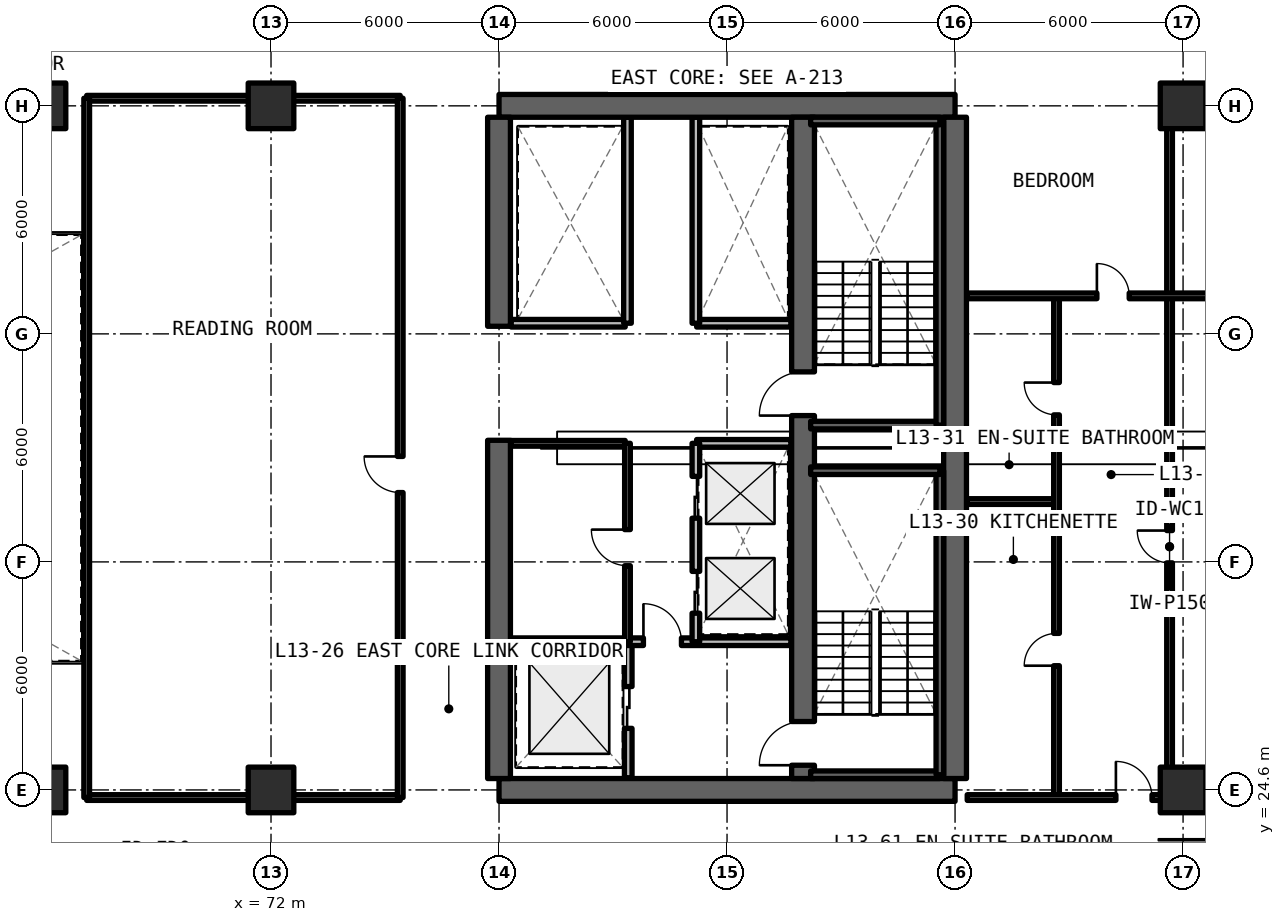
"""IFC4 building model, lengths in metres.
Left out: names, types, materials, properties, quantities, classifications, styles, units other than length and angle.
Written with IfcOpenShell. Run it as: python <this file> out.ifc"""

import sys

from ifc_helpers import new_model, si_unit, direction, frame, frame_2d, origin, origin_2d, place, context, subcontext, project, spatial, rectangle, extrude, element, fill, save


model = new_model("IFC4")
c1 = context("Model", 3, precision=1e-05, world=origin(), true_north=direction((0.0, 1.0)))
c2 = subcontext(c1, "Body", "Model", "MODEL_VIEW")
j1 = project(units=[si_unit("LENGTHUNIT", "METRE"), si_unit("PLANEANGLEUNIT", "RADIAN")], contexts=[c1])
p1 = place(None, origin())
s1 = spatial("IfcSite", under=j1, at=p1, CompositionType="ELEMENT")
p2 = place(p1, origin())
s2 = spatial("IfcBuilding", under=s1, at=p2, CompositionType="ELEMENT")
p3 = place(p2, frame((0.0, 0.0, 48.84)))
s3 = spatial("IfcBuildingStorey", under=s2, at=p3, CompositionType="ELEMENT", Elevation=48.84)
for number, where, z_axis, x_axis in (
    (1, (78.0, 24.6, 0.0), (0.0, 0.0, 1.0), (1.0, 0.0, 0.0)),
    (2, (90.0, 42.6, 0.0), (0.0, 0.0, 1.0), (-1.0, 0.0, 0.0)),
):
    element("IfcWall", number, at=place(p3, frame(where, z_axis=z_axis, x_axis=x_axis)), inside=s3, PredefinedType="SHEAR", context=c2, shape_type="SweptSolid", body=[
        extrude(rectangle(XDim=12.0, YDim=0.6, at=frame_2d((6.0, 0.0))), origin(), (0.0, 0.0, 1.0), 3.3),
    ])
p4 = place(p3, frame((90.0, 24.9, 0.0), z_axis=(0.0, 0.0, 1.0), x_axis=(0.0, 1.0, 0.0)))
e3 = element("IfcWall", 3, at=p4, inside=s3, PredefinedType="SHEAR", context=c2, shape_type="SweptSolid", body=[
    extrude(rectangle(XDim=17.4, YDim=0.6, at=frame_2d((8.7, 0.0))), origin(), (0.0, 0.0, 1.0), 3.3),
])
p5 = place(p3, frame((78.0, 24.9, 0.0), z_axis=(0.0, 0.0, 1.0), x_axis=(0.0, 1.0, 0.0)))
e4 = element("IfcWall", 4, at=p5, inside=s3, PredefinedType="SHEAR", context=c2, shape_type="SweptSolid", body=[
    extrude(rectangle(XDim=8.9, YDim=0.6, at=frame_2d((4.45, 0.0))), origin(), (0.0, 0.0, 1.0), 3.3),
])
p6 = place(p3, frame((78.0, 36.8, 0.0), z_axis=(0.0, 0.0, 1.0), x_axis=(0.0, 1.0, 0.0)))
e5 = element("IfcWall", 5, at=p6, inside=s3, PredefinedType="SHEAR", context=c2, shape_type="SweptSolid", body=[
    extrude(rectangle(XDim=5.5, YDim=0.6, at=frame_2d((2.75, 0.0))), origin(), (0.0, 0.0, 1.0), 3.3),
])
p7 = place(p3, frame((86.0, 24.9, 0.0), z_axis=(0.0, 0.0, 1.0), x_axis=(0.0, 1.0, 0.0)))
e6 = element("IfcWall", 6, at=p7, inside=s3, PredefinedType="SHEAR", context=c2, shape_type="SweptSolid", body=[
    extrude(rectangle(XDim=17.4, YDim=0.6, at=frame_2d((8.7, 0.0))), origin(), (0.0, 0.0, 1.0), 3.3),
])
p8 = place(p7, frame((0.35, 0.0, 0.0)))
e7 = element("IfcOpeningElement", 7, at=p8, cuts=e6, PredefinedType="OPENING", context=c2, shape_type="SweptSolid", body=[
    extrude(rectangle(XDim=1.15, YDim=2.15, at=frame_2d((0.575, 1.075))), frame((0.0, 0.31, 0.0), z_axis=(0.0, -1.0, 0.0), x_axis=(1.0, 0.0, 0.0)), (0.0, 0.0, 1.0), 0.62),
])
p9 = place(p7, frame((9.55, 0.0, 0.0)))
e8 = element("IfcOpeningElement", 8, at=p9, cuts=e6, PredefinedType="OPENING", context=c2, shape_type="SweptSolid", body=[
    extrude(rectangle(XDim=1.15, YDim=2.15, at=frame_2d((0.575, 1.075))), frame((0.0, 0.31, 0.0), z_axis=(0.0, -1.0, 0.0), x_axis=(1.0, 0.0, 0.0)), (0.0, 0.0, 1.0), 0.62),
])
for number, where, z_axis, x_axis in (
    (9, (66.0, 24.6, 0.0), (0.0, 0.0, 1.0), (1.0, 0.0, 0.0)),
    (10, (66.0, 42.6, 0.0), (0.0, 0.0, 1.0), (1.0, 0.0, 0.0)),
    (11, (72.0, 24.6, 0.0), (0.0, 0.0, 1.0), (1.0, 0.0, 0.0)),
    (12, (72.0, 42.6, 0.0), (0.0, 0.0, 1.0), (1.0, 0.0, 0.0)),
    (13, (96.0, 24.6, 0.0), (0.0, 0.0, 1.0), (1.0, 0.0, 0.0)),
    (14, (96.0, 42.6, 0.0), (0.0, 0.0, 1.0), (1.0, 0.0, 0.0)),
):
    element("IfcColumn", number, at=place(p3, frame(where, z_axis=z_axis, x_axis=x_axis)), inside=s3, PredefinedType="COLUMN", context=c2, shape_type="SweptSolid", body=[
        extrude(rectangle(XDim=1.2, YDim=1.2, at=origin_2d()), origin(), (0.0, 0.0, 1.0), 3.3),
    ])
p10 = place(p3, frame((81.4, 24.92, 0.0), z_axis=(0.0, 0.0, 1.0), x_axis=(0.0, 1.0, 0.0)))
e15 = element("IfcWall", 15, at=p10, inside=s3, PredefinedType="SOLIDWALL", context=c2, shape_type="SweptSolid", body=[
    extrude(rectangle(XDim=3.58, YDim=0.2, at=frame_2d((1.79, 0.0))), origin(), (0.0, 0.0, 1.0), 2.35),
])
p11 = place(p10, frame((1.3, 0.0, 0.0)))
e16 = element("IfcOpeningElement", 16, at=p11, cuts=e15, PredefinedType="OPENING", context=c2, shape_type="SweptSolid", body=[
    extrude(rectangle(XDim=1.1, YDim=2.2, at=frame_2d((0.55, 1.1))), frame((0.0, 0.11, 0.0), z_axis=(0.0, -1.0, 0.0), x_axis=(1.0, 0.0, 0.0)), (0.0, 0.0, 1.0), 0.22),
])
p12 = place(p3, frame((78.32, 28.5, 0.0), z_axis=(0.0, 0.0, 1.0), x_axis=(1.0, 0.0, 0.0)))
e17 = element("IfcWall", 17, at=p12, inside=s3, PredefinedType="SOLIDWALL", context=c2, shape_type="SweptSolid", body=[
    extrude(rectangle(XDim=7.36, YDim=0.2, at=frame_2d((3.68, 0.0))), origin(), (0.0, 0.0, 1.0), 2.35),
])
p13 = place(p12, frame((3.48, 0.0, 0.0)))
e18 = element("IfcOpeningElement", 18, at=p13, cuts=e17, PredefinedType="OPENING", context=c2, shape_type="SweptSolid", body=[
    extrude(rectangle(XDim=1.0, YDim=2.15, at=frame_2d((0.5, 1.075))), frame((0.0, 0.11, 0.0), z_axis=(0.0, -1.0, 0.0), x_axis=(1.0, 0.0, 0.0)), (0.0, 0.0, 1.0), 0.22),
])
p14 = place(p3, frame((83.2, 33.72, 0.0), z_axis=(0.0, 0.0, 1.0), x_axis=(1.0, 0.0, 0.0)))
e19 = element("IfcWall", 19, at=p14, inside=s3, PredefinedType="SOLIDWALL", context=c2, shape_type="SweptSolid", body=[
    extrude(rectangle(XDim=2.48, YDim=0.2, at=frame_2d((1.24, 0.0))), origin(), (0.0, 0.0, 1.0), 2.35),
])
p15 = place(p3, frame((83.18, 28.5, 0.0), z_axis=(0.0, 0.0, 1.0), x_axis=(0.0, 1.0, 0.0)))
e20 = element("IfcWall", 20, at=p15, inside=s3, PredefinedType="SOLIDWALL", context=c2, shape_type="SweptSolid", body=[
    extrude(rectangle(XDim=5.22, YDim=0.2, at=frame_2d((2.61, 0.0))), origin(), (0.0, 0.0, 1.0), 2.35),
])
p16 = place(p15, frame((0.75, 0.0, 0.0)))
e21 = element("IfcOpeningElement", 21, at=p16, cuts=e20, PredefinedType="OPENING", context=c2, shape_type="SweptSolid", body=[
    extrude(rectangle(XDim=1.1, YDim=2.2, at=frame_2d((0.55, 1.1))), frame((0.0, 0.11, 0.0), z_axis=(0.0, -1.0, 0.0), x_axis=(1.0, 0.0, 0.0)), (0.0, 0.0, 1.0), 0.22),
])
p17 = place(p15, frame((3.25, 0.0, 0.0)))
e22 = element("IfcOpeningElement", 22, at=p17, cuts=e20, PredefinedType="OPENING", context=c2, shape_type="SweptSolid", body=[
    extrude(rectangle(XDim=1.1, YDim=2.2, at=frame_2d((0.55, 1.1))), frame((0.0, 0.11, 0.0), z_axis=(0.0, -1.0, 0.0), x_axis=(1.0, 0.0, 0.0)), (0.0, 0.0, 1.0), 0.22),
])
p18 = place(p3, frame((78.32, 33.72, 0.0), z_axis=(0.0, 0.0, 1.0), x_axis=(1.0, 0.0, 0.0)))
e23 = element("IfcWall", 23, at=p18, inside=s3, PredefinedType="SOLIDWALL", context=c2, shape_type="SweptSolid", body=[
    extrude(rectangle(XDim=3.0, YDim=0.15, at=frame_2d((1.5, 0.0))), origin(), (0.0, 0.0, 1.0), 2.35),
])
p19 = place(p3, frame((81.38, 28.5, 0.0), z_axis=(0.0, 0.0, 1.0), x_axis=(0.0, 1.0, 0.0)))
e24 = element("IfcWall", 24, at=p19, inside=s3, PredefinedType="SOLIDWALL", context=c2, shape_type="SweptSolid", body=[
    extrude(rectangle(XDim=5.22, YDim=0.15, at=frame_2d((2.61, 0.0))), origin(), (0.0, 0.0, 1.0), 2.35),
])
p20 = place(p19, frame((2.0, 0.0, 0.0)))
e25 = element("IfcOpeningElement", 25, at=p20, cuts=e24, PredefinedType="OPENING", context=c2, shape_type="SweptSolid", body=[
    extrude(rectangle(XDim=0.95, YDim=2.15, at=frame_2d((0.475, 1.075))), frame((0.0, 0.085, 0.0), z_axis=(0.0, -1.0, 0.0), x_axis=(1.0, 0.0, 0.0)), (0.0, 0.0, 1.0), 0.17),
])
p21 = place(p3, frame((83.2, 36.88, 0.0), z_axis=(0.0, 0.0, 1.0), x_axis=(1.0, 0.0, 0.0)))
e26 = element("IfcWall", 26, at=p21, inside=s3, PredefinedType="SOLIDWALL", context=c2, shape_type="SweptSolid", body=[
    extrude(rectangle(XDim=2.48, YDim=0.2, at=frame_2d((1.24, 0.0))), origin(), (0.0, 0.0, 1.0), 2.35),
])
p22 = place(p3, frame((83.18, 36.88, 0.0), z_axis=(0.0, 0.0, 1.0), x_axis=(0.0, 1.0, 0.0)))
e27 = element("IfcWall", 27, at=p22, inside=s3, PredefinedType="SOLIDWALL", context=c2, shape_type="SweptSolid", body=[
    extrude(rectangle(XDim=5.42, YDim=0.2, at=frame_2d((2.71, 0.0))), origin(), (0.0, 0.0, 1.0), 2.35),
])
p23 = place(p3, frame((78.32, 36.88, 0.0), z_axis=(0.0, 0.0, 1.0), x_axis=(1.0, 0.0, 0.0)))
e28 = element("IfcWall", 28, at=p23, inside=s3, PredefinedType="SOLIDWALL", context=c2, shape_type="SweptSolid", body=[
    extrude(rectangle(XDim=3.0, YDim=0.2, at=frame_2d((1.5, 0.0))), origin(), (0.0, 0.0, 1.0), 2.35),
])
p24 = place(p3, frame((81.38, 36.88, 0.0), z_axis=(0.0, 0.0, 1.0), x_axis=(0.0, 1.0, 0.0)))
e29 = element("IfcWall", 29, at=p24, inside=s3, PredefinedType="SOLIDWALL", context=c2, shape_type="SweptSolid", body=[
    extrude(rectangle(XDim=5.42, YDim=0.2, at=frame_2d((2.71, 0.0))), origin(), (0.0, 0.0, 1.0), 2.35),
])
for number, where, z_axis, x_axis in (
    (30, (67.15, 24.4, 0.0), (0.0, 0.0, 1.0), (1.0, 0.0, 0.0)),
    (31, (67.15, 42.8, 0.0), (0.0, 0.0, 1.0), (1.0, 0.0, 0.0)),
):
    element("IfcWall", number, at=place(p3, frame(where, z_axis=z_axis, x_axis=x_axis)), inside=s3, PredefinedType="SOLIDWALL", context=c2, shape_type="SweptSolid", body=[
        extrude(rectangle(XDim=8.25, YDim=0.15, at=frame_2d((4.125, 0.0))), origin(), (0.0, 0.0, 1.0), 2.295),
    ])
p25 = place(p3, frame((67.15, 24.4, 0.0), z_axis=(0.0, 0.0, 1.0), x_axis=(0.0, 1.0, 0.0)))
e32 = element("IfcWall", 32, at=p25, inside=s3, PredefinedType="SOLIDWALL", context=c2, shape_type="SweptSolid", body=[
    extrude(rectangle(XDim=18.4, YDim=0.15, at=frame_2d((9.2, 0.0))), origin(), (0.0, 0.0, 1.0), 2.35),
])
p26 = place(p3, frame((75.4, 24.4, 0.0), z_axis=(0.0, 0.0, 1.0), x_axis=(0.0, 1.0, 0.0)))
e33 = element("IfcWall", 33, at=p26, inside=s3, PredefinedType="SOLIDWALL", context=c2, shape_type="SweptSolid", body=[
    extrude(rectangle(XDim=18.4, YDim=0.15, at=frame_2d((9.2, 0.0))), origin(), (0.0, 0.0, 1.0), 2.35),
])
p27 = place(p26, frame((8.025, 0.0, 0.0)))
e34 = element("IfcOpeningElement", 34, at=p27, cuts=e33, PredefinedType="OPENING", context=c2, shape_type="SweptSolid", body=[
    extrude(rectangle(XDim=0.95, YDim=2.15, at=frame_2d((0.475, 1.075))), frame((0.0, 0.085, 0.0), z_axis=(0.0, -1.0, 0.0), x_axis=(1.0, 0.0, 0.0)), (0.0, 0.0, 1.0), 0.17),
])
p28 = place(p3, frame((95.645, 24.4, 0.0), z_axis=(0.0, 0.0, 1.0), x_axis=(0.0, 1.0, 0.0)))
e35 = element("IfcWall", 35, at=p28, inside=s3, PredefinedType="PARTITIONING", context=c2, shape_type="SweptSolid", body=[
    extrude(rectangle(XDim=13.2, YDim=0.15, at=frame_2d((6.6, 0.0))), origin(), (0.0, 0.0, 1.0), 2.35),
])
p29 = place(p28, frame((6.175, 0.0, 0.0)))
e36 = element("IfcOpeningElement", 36, at=p29, cuts=e35, PredefinedType="OPENING", context=c2, shape_type="SweptSolid", body=[
    extrude(rectangle(XDim=0.85, YDim=2.1, at=frame_2d((0.425, 1.05))), frame((0.0, 0.085, 0.0), z_axis=(0.0, -1.0, 0.0), x_axis=(1.0, 0.0, 0.0)), (0.0, 0.0, 1.0), 0.17),
])
p30 = place(p3, frame((90.32, 32.188, 0.0), z_axis=(0.0, 0.0, 1.0), x_axis=(1.0, 0.0, 0.0)))
e37 = element("IfcWall", 37, at=p30, inside=s3, PredefinedType="PARTITIONING", context=c2, shape_type="SweptSolid", body=[
    extrude(rectangle(XDim=2.35, YDim=0.15, at=frame_2d((1.175, 0.0))), origin(), (0.0, 0.0, 1.0), 2.35),
])
p31 = place(p3, frame((92.67, 24.4, 0.0), z_axis=(0.0, 0.0, 1.0), x_axis=(0.0, 1.0, 0.0)))
e38 = element("IfcWall", 38, at=p31, inside=s3, PredefinedType="PARTITIONING", context=c2, shape_type="SweptSolid", body=[
    extrude(rectangle(XDim=13.2, YDim=0.15, at=frame_2d((6.6, 0.0))), origin(), (0.0, 0.0, 1.0), 2.35),
])
p32 = place(p31, frame((3.469, 0.0, 0.0)))
e39 = element("IfcOpeningElement", 39, at=p32, cuts=e38, PredefinedType="OPENING", context=c2, shape_type="SweptSolid", body=[
    extrude(rectangle(XDim=0.85, YDim=2.1, at=frame_2d((0.425, 1.05))), frame((0.0, 0.085, 0.0), z_axis=(0.0, -1.0, 0.0), x_axis=(1.0, 0.0, 0.0)), (0.0, 0.0, 1.0), 0.17),
])
p33 = place(p31, frame((10.069, 0.0, 0.0)))
e40 = element("IfcOpeningElement", 40, at=p33, cuts=e38, PredefinedType="OPENING", context=c2, shape_type="SweptSolid", body=[
    extrude(rectangle(XDim=0.85, YDim=2.1, at=frame_2d((0.425, 1.05))), frame((0.0, 0.085, 0.0), z_axis=(0.0, -1.0, 0.0), x_axis=(1.0, 0.0, 0.0)), (0.0, 0.0, 1.0), 0.17),
])
p34 = place(p3, frame((95.645, 37.6, 0.0), z_axis=(0.0, 0.0, 1.0), x_axis=(0.0, 1.0, 0.0)))
e41 = element("IfcWall", 41, at=p34, inside=s3, PredefinedType="PARTITIONING", context=c2, shape_type="SweptSolid", body=[
    extrude(rectangle(XDim=5.2, YDim=0.15, at=frame_2d((2.6, 0.0))), origin(), (0.0, 0.0, 1.0), 2.35),
])
p35 = place(p3, frame((90.32, 37.6, 0.0), z_axis=(0.0, 0.0, 1.0), x_axis=(1.0, 0.0, 0.0)))
e42 = element("IfcWall", 42, at=p35, inside=s3, PredefinedType="PARTITIONING", context=c2, shape_type="SweptSolid", body=[
    extrude(rectangle(XDim=10.24, YDim=0.15, at=frame_2d((5.12, 0.0))), origin(), (0.0, 0.0, 1.0), 2.35),
])
p36 = place(p35, frame((3.412, 0.0, 0.0)))
e43 = element("IfcOpeningElement", 43, at=p36, cuts=e42, PredefinedType="OPENING", context=c2, shape_type="SweptSolid", body=[
    extrude(rectangle(XDim=0.85, YDim=2.1, at=frame_2d((0.425, 1.05))), frame((0.0, 0.085, 0.0), z_axis=(0.0, -1.0, 0.0), x_axis=(1.0, 0.0, 0.0)), (0.0, 0.0, 1.0), 0.17),
])
p37 = place(p35, frame((7.357, 0.0, 0.0)))
e44 = element("IfcOpeningElement", 44, at=p37, cuts=e42, PredefinedType="OPENING", context=c2, shape_type="SweptSolid", body=[
    extrude(rectangle(XDim=0.85, YDim=2.1, at=frame_2d((0.425, 1.05))), frame((0.0, 0.085, 0.0), z_axis=(0.0, -1.0, 0.0), x_axis=(1.0, 0.0, 0.0)), (0.0, 0.0, 1.0), 0.17),
])
p38 = place(p3, frame((90.32, 24.4, 0.0), z_axis=(0.0, 0.0, 1.0), x_axis=(1.0, 0.0, 0.0)))
e45 = element("IfcWall", 45, at=p38, inside=s3, PredefinedType="SOLIDWALL", context=c2, shape_type="SweptSolid", body=[
    extrude(rectangle(XDim=10.24, YDim=0.15, at=frame_2d((5.12, 0.0))), origin(), (0.0, 0.0, 1.0), 2.295),
])
p39 = place(p38, frame((3.913, 0.0, 0.0)))
e46 = element("IfcOpeningElement", 46, at=p39, cuts=e45, PredefinedType="OPENING", context=c2, shape_type="SweptSolid", body=[
    extrude(rectangle(XDim=0.95, YDim=2.15, at=frame_2d((0.475, 1.075))), frame((0.0, 0.085, 0.0), z_axis=(0.0, -1.0, 0.0), x_axis=(1.0, 0.0, 0.0)), (0.0, 0.0, 1.0), 0.17),
])
p40 = place(p3, frame((86.2, 25.0, 0.0), z_axis=(0.0, 0.0, 1.0), x_axis=(1.0, 0.0, 0.0)))
e47 = element("IfcWall", 47, at=p40, inside=s3, PredefinedType="SOLIDWALL", context=c2, shape_type="SweptSolid", body=[
    extrude(rectangle(XDim=3.4, YDim=0.2, at=frame_2d((1.7, 0.0))), origin(), (0.0, 0.0, 1.0), 3.3),
])
p41 = place(p3, frame((89.6, 25.0, 0.0), z_axis=(0.0, 0.0, 1.0), x_axis=(0.0, 1.0, 0.0)))
e48 = element("IfcWall", 48, at=p41, inside=s3, PredefinedType="SOLIDWALL", context=c2, shape_type="SweptSolid", body=[
    extrude(rectangle(XDim=8.0, YDim=0.2, at=frame_2d((4.0, 0.0))), origin(), (0.0, 0.0, 1.0), 3.3),
])
for number, where, z_axis, x_axis in (
    (49, (89.6, 33.0, 0.0), (0.0, 0.0, 1.0), (-1.0, 0.0, 0.0)),
    (50, (86.2, 34.2, 0.0), (0.0, 0.0, 1.0), (1.0, 0.0, 0.0)),
):
    element("IfcWall", number, at=place(p3, frame(where, z_axis=z_axis, x_axis=x_axis)), inside=s3, PredefinedType="SOLIDWALL", context=c2, shape_type="SweptSolid", body=[
        extrude(rectangle(XDim=3.4, YDim=0.2, at=frame_2d((1.7, 0.0))), origin(), (0.0, 0.0, 1.0), 3.3),
    ])
p42 = place(p3, frame((89.6, 34.2, 0.0), z_axis=(0.0, 0.0, 1.0), x_axis=(0.0, 1.0, 0.0)))
e51 = element("IfcWall", 51, at=p42, inside=s3, PredefinedType="SOLIDWALL", context=c2, shape_type="SweptSolid", body=[
    extrude(rectangle(XDim=8.0, YDim=0.2, at=frame_2d((4.0, 0.0))), origin(), (0.0, 0.0, 1.0), 3.3),
])
p43 = place(p3, frame((89.6, 42.2, 0.0), z_axis=(0.0, 0.0, 1.0), x_axis=(-1.0, 0.0, 0.0)))
e52 = element("IfcWall", 52, at=p43, inside=s3, PredefinedType="SOLIDWALL", context=c2, shape_type="SweptSolid", body=[
    extrude(rectangle(XDim=3.4, YDim=0.2, at=frame_2d((1.7, 0.0))), origin(), (0.0, 0.0, 1.0), 3.3),
])
p44 = place(p11, origin())
e53 = element("IfcDoor", 53, at=p44, inside=s3, OperationType="SLIDING_TO_LEFT", PredefinedType="DOOR", context=c2, shape_type="SweptSolid", body=[
    extrude(rectangle(XDim=1.1, YDim=2.2, at=frame_2d((0.55, 1.1))), frame((0.0, 0.025, 0.0), z_axis=(0.0, -1.0, 0.0), x_axis=(1.0, 0.0, 0.0)), (0.0, 0.0, 1.0), 0.05),
])
fill(e16, e53)
p45 = place(p13, origin())
e54 = element("IfcDoor", 54, at=p45, inside=s3, OperationType="SINGLE_SWING_LEFT", PredefinedType="DOOR", context=c2, shape_type="SweptSolid", body=[
    extrude(rectangle(XDim=1.0, YDim=2.15, at=frame_2d((0.5, 1.075))), frame((0.0, 0.025, 0.0), z_axis=(0.0, -1.0, 0.0), x_axis=(1.0, 0.0, 0.0)), (0.0, 0.0, 1.0), 0.05),
])
fill(e18, e54)
p46 = place(p16, origin())
e55 = element("IfcDoor", 55, at=p46, inside=s3, OperationType="SLIDING_TO_LEFT", PredefinedType="DOOR", context=c2, shape_type="SweptSolid", body=[
    extrude(rectangle(XDim=1.1, YDim=2.2, at=frame_2d((0.55, 1.1))), frame((0.0, 0.025, 0.0), z_axis=(0.0, -1.0, 0.0), x_axis=(1.0, 0.0, 0.0)), (0.0, 0.0, 1.0), 0.05),
])
fill(e21, e55)
p47 = place(p17, origin())
e56 = element("IfcDoor", 56, at=p47, inside=s3, OperationType="SLIDING_TO_RIGHT", PredefinedType="DOOR", context=c2, shape_type="SweptSolid", body=[
    extrude(rectangle(XDim=1.1, YDim=2.2, at=frame_2d((0.55, 1.1))), frame((0.0, 0.025, 0.0), z_axis=(0.0, -1.0, 0.0), x_axis=(1.0, 0.0, 0.0)), (0.0, 0.0, 1.0), 0.05),
])
fill(e22, e56)
p48 = place(p20, origin())
e57 = element("IfcDoor", 57, at=p48, inside=s3, OperationType="SINGLE_SWING_RIGHT", PredefinedType="DOOR", context=c2, shape_type="SweptSolid", body=[
    extrude(rectangle(XDim=0.95, YDim=2.15, at=frame_2d((0.475, 1.075))), frame((0.0, 0.025, 0.0), z_axis=(0.0, -1.0, 0.0), x_axis=(1.0, 0.0, 0.0)), (0.0, 0.0, 1.0), 0.05),
])
fill(e25, e57)
p49 = place(p27, origin())
e58 = element("IfcDoor", 58, at=p49, inside=s3, OperationType="SINGLE_SWING_RIGHT", PredefinedType="DOOR", context=c2, shape_type="SweptSolid", body=[
    extrude(rectangle(XDim=0.95, YDim=2.15, at=frame_2d((0.475, 1.075))), frame((0.0, 0.025, 0.0), z_axis=(0.0, -1.0, 0.0), x_axis=(1.0, 0.0, 0.0)), (0.0, 0.0, 1.0), 0.05),
])
fill(e34, e58)
p50 = place(p29, origin())
e59 = element("IfcDoor", 59, at=p50, inside=s3, OperationType="SINGLE_SWING_RIGHT", PredefinedType="DOOR", context=c2, shape_type="SweptSolid", body=[
    extrude(rectangle(XDim=0.85, YDim=2.1, at=frame_2d((0.425, 1.05))), frame((0.0, 0.025, 0.0), z_axis=(0.0, -1.0, 0.0), x_axis=(1.0, 0.0, 0.0)), (0.0, 0.0, 1.0), 0.05),
])
fill(e36, e59)
p51 = place(p32, origin())
e60 = element("IfcDoor", 60, at=p51, inside=s3, OperationType="SINGLE_SWING_LEFT", PredefinedType="DOOR", context=c2, shape_type="SweptSolid", body=[
    extrude(rectangle(XDim=0.85, YDim=2.1, at=frame_2d((0.425, 1.05))), frame((0.0, 0.025, 0.0), z_axis=(0.0, -1.0, 0.0), x_axis=(1.0, 0.0, 0.0)), (0.0, 0.0, 1.0), 0.05),
])
fill(e39, e60)
p52 = place(p33, origin())
e61 = element("IfcDoor", 61, at=p52, inside=s3, OperationType="SINGLE_SWING_RIGHT", PredefinedType="DOOR", context=c2, shape_type="SweptSolid", body=[
    extrude(rectangle(XDim=0.85, YDim=2.1, at=frame_2d((0.425, 1.05))), frame((0.0, 0.025, 0.0), z_axis=(0.0, -1.0, 0.0), x_axis=(1.0, 0.0, 0.0)), (0.0, 0.0, 1.0), 0.05),
])
fill(e40, e61)
p53 = place(p36, origin())
e62 = element("IfcDoor", 62, at=p53, inside=s3, OperationType="SINGLE_SWING_LEFT", PredefinedType="DOOR", context=c2, shape_type="SweptSolid", body=[
    extrude(rectangle(XDim=0.85, YDim=2.1, at=frame_2d((0.425, 1.05))), frame((0.0, 0.025, 0.0), z_axis=(0.0, -1.0, 0.0), x_axis=(1.0, 0.0, 0.0)), (0.0, 0.0, 1.0), 0.05),
])
fill(e43, e62)
p54 = place(p39, origin())
e63 = element("IfcDoor", 63, at=p54, inside=s3, OperationType="SINGLE_SWING_LEFT", PredefinedType="DOOR", context=c2, shape_type="SweptSolid", body=[
    extrude(rectangle(XDim=0.95, YDim=2.15, at=frame_2d((0.475, 1.075))), frame((0.0, 0.025, 0.0), z_axis=(0.0, -1.0, 0.0), x_axis=(1.0, 0.0, 0.0)), (0.0, 0.0, 1.0), 0.05),
])
fill(e46, e63)
p55 = place(p8, origin())
e64 = element("IfcDoor", 64, at=p55, inside=s3, OperationType="SINGLE_SWING_RIGHT", PredefinedType="DOOR", context=c2, shape_type="SweptSolid", body=[
    extrude(rectangle(XDim=1.15, YDim=2.15, at=frame_2d((0.575, 1.075))), frame((0.0, 0.025, 0.0), z_axis=(0.0, -1.0, 0.0), x_axis=(1.0, 0.0, 0.0)), (0.0, 0.0, 1.0), 0.05),
])
fill(e7, e64)
p56 = place(p9, origin())
e65 = element("IfcDoor", 65, at=p56, inside=s3, OperationType="SINGLE_SWING_LEFT", PredefinedType="DOOR", context=c2, shape_type="SweptSolid", body=[
    extrude(rectangle(XDim=1.15, YDim=2.15, at=frame_2d((0.575, 1.075))), frame((0.0, 0.025, 0.0), z_axis=(0.0, -1.0, 0.0), x_axis=(1.0, 0.0, 0.0)), (0.0, 0.0, 1.0), 0.05),
])
fill(e8, e65)
save(model, sys.argv[1])
